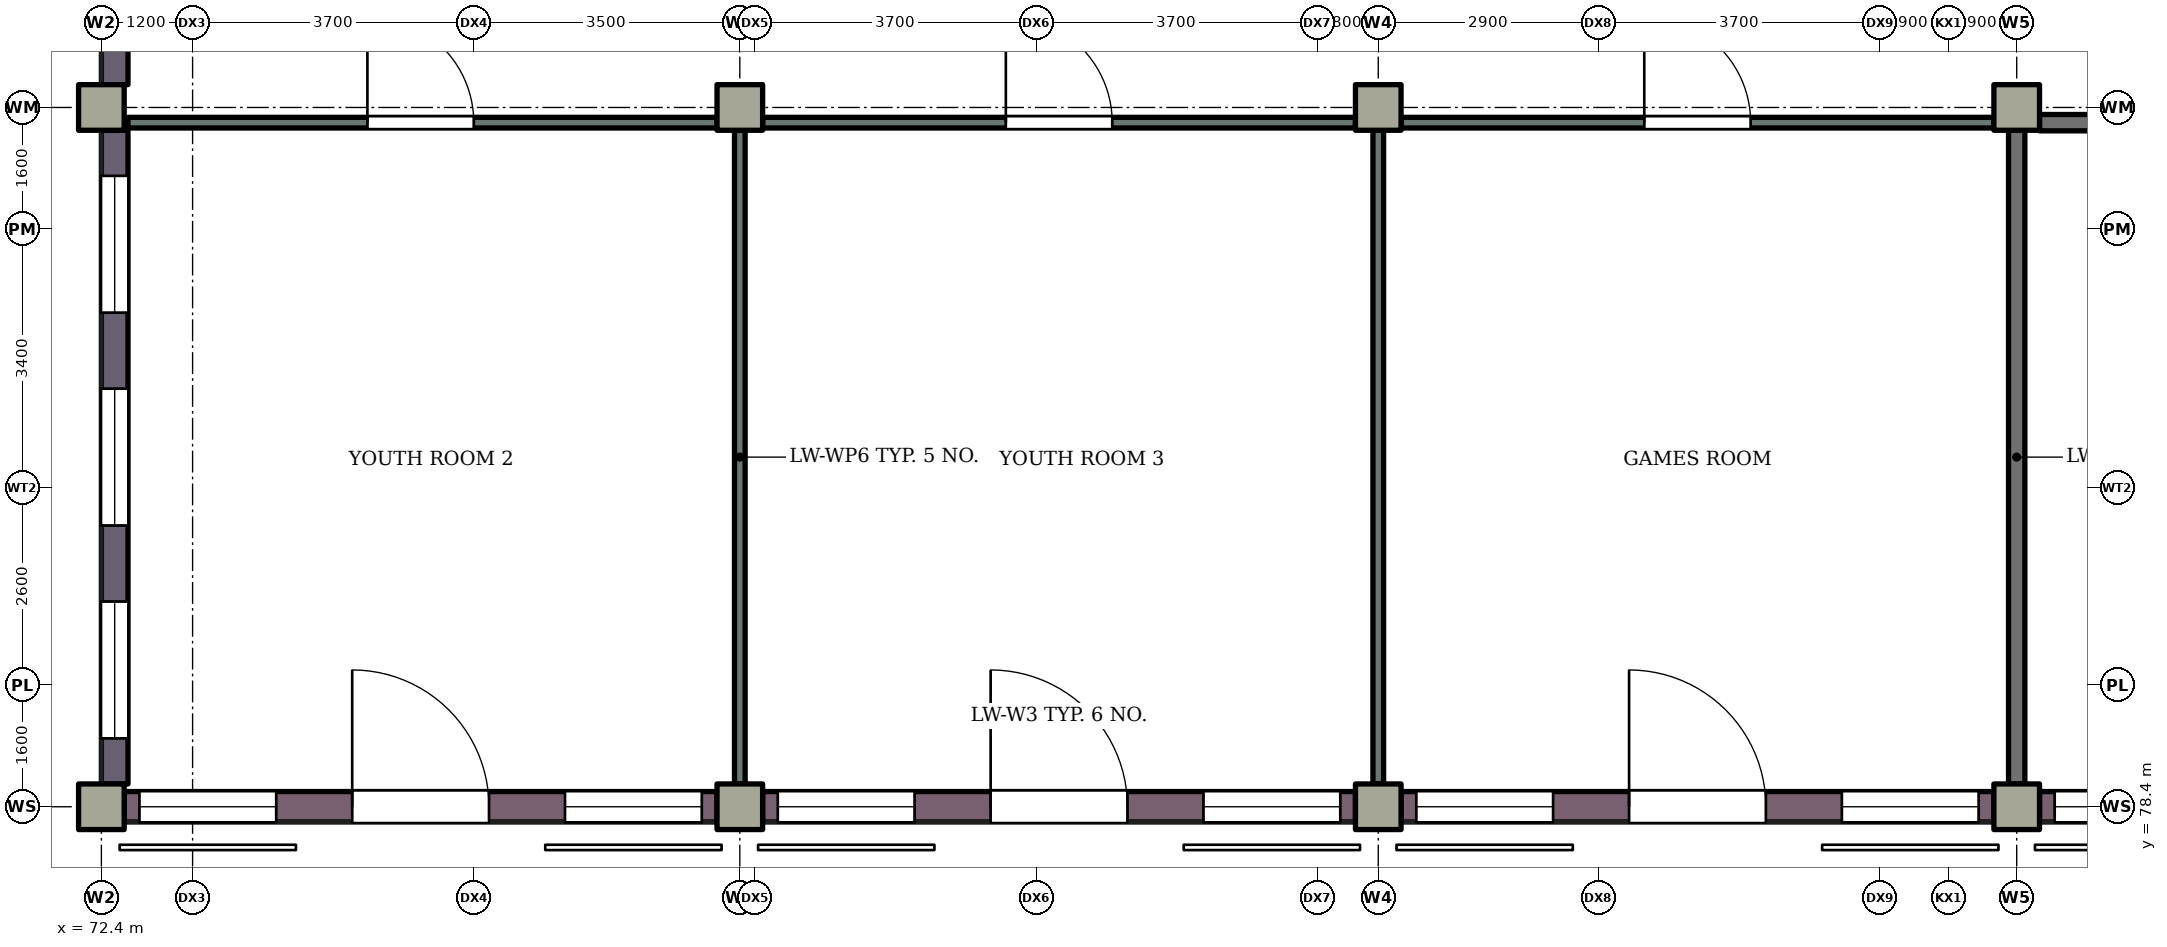
"""IFC4 building model, lengths in metres.
Left out: names, types, materials, properties, quantities, classifications, styles, units other than length and angle.
Written with IfcOpenShell. Run it as: python <this file> out.ifc"""

import sys

from ifc_helpers import new_model, si_unit, direction, frame, frame_2d, origin, origin_2d, place, context, subcontext, project, spatial, rectangle, extrude, element, fill, save


model = new_model("IFC4")
c1 = context("Model", 3, precision=1e-05, world=origin(), true_north=direction((0.0, 1.0)))
c2 = subcontext(c1, "Body", "Model", "MODEL_VIEW")
j1 = project(units=[si_unit("LENGTHUNIT", "METRE"), si_unit("PLANEANGLEUNIT", "RADIAN")], contexts=[c1])
p1 = place(None, origin())
s1 = spatial("IfcSite", under=j1, at=p1, CompositionType="ELEMENT")
p2 = place(p1, origin())
s2 = spatial("IfcBuilding", under=s1, at=p2, CompositionType="ELEMENT")
p3 = place(p2, frame((0.0, 0.0, 8.4)))
s3 = spatial("IfcBuildingStorey", under=s2, at=p3, CompositionType="ELEMENT", Elevation=8.4)
for number, where, z_axis, x_axis in (
    (1, (72.4, 87.6, 0.0), (0.0, 0.0, 1.0), (1.0, 0.0, 0.0)),
    (2, (80.8, 87.6, 0.0), (0.0, 0.0, 1.0), (1.0, 0.0, 0.0)),
    (3, (89.2, 87.6, 0.0), (0.0, 0.0, 1.0), (1.0, 0.0, 0.0)),
    (4, (97.6, 87.6, 0.0), (0.0, 0.0, 1.0), (1.0, 0.0, 0.0)),
    (5, (72.4, 78.4, 0.0), (0.0, 0.0, 1.0), (1.0, 0.0, 0.0)),
    (6, (80.8, 78.4, 0.0), (0.0, 0.0, 1.0), (1.0, 0.0, 0.0)),
    (7, (89.2, 78.4, 0.0), (0.0, 0.0, 1.0), (1.0, 0.0, 0.0)),
    (8, (97.6, 78.4, 0.0), (0.0, 0.0, 1.0), (1.0, 0.0, 0.0)),
):
    element("IfcColumn", number, at=place(p3, frame(where, z_axis=z_axis, x_axis=x_axis)), inside=s3, PredefinedType="COLUMN", context=c2, shape_type="SweptSolid", body=[
        extrude(rectangle(XDim=0.6, YDim=0.6, at=origin_2d()), origin(), (0.0, 0.0, 1.0), 4.2),
    ])
p4 = place(p3, frame((72.575, 78.7, 0.0), z_axis=(0.0, 0.0, 1.0), x_axis=(0.0, 1.0, 0.0)))
e9 = element("IfcWall", 9, at=p4, inside=s3, PredefinedType="SHEAR", context=c2, shape_type="SweptSolid", body=[
    extrude(rectangle(XDim=8.6, YDim=0.35, at=frame_2d((4.3, 0.0))), origin(), (0.0, 0.0, 1.0), 4.2),
])
p5 = place(p4, frame((0.6, 0.0, 0.9)))
e10 = element("IfcOpeningElement", 10, at=p5, cuts=e9, PredefinedType="OPENING", context=c2, shape_type="SweptSolid", body=[
    extrude(rectangle(XDim=1.8, YDim=2.1, at=frame_2d((0.9, 1.05))), frame((0.0, 0.185, 0.0), z_axis=(0.0, -1.0, 0.0), x_axis=(1.0, 0.0, 0.0)), (0.0, 0.0, 1.0), 0.37),
])
p6 = place(p4, frame((3.4, 0.0, 0.9)))
e11 = element("IfcOpeningElement", 11, at=p6, cuts=e9, PredefinedType="OPENING", context=c2, shape_type="SweptSolid", body=[
    extrude(rectangle(XDim=1.8, YDim=2.1, at=frame_2d((0.9, 1.05))), frame((0.0, 0.185, 0.0), z_axis=(0.0, -1.0, 0.0), x_axis=(1.0, 0.0, 0.0)), (0.0, 0.0, 1.0), 0.37),
])
p7 = place(p4, frame((6.2, 0.0, 0.9)))
e12 = element("IfcOpeningElement", 12, at=p7, cuts=e9, PredefinedType="OPENING", context=c2, shape_type="SweptSolid", body=[
    extrude(rectangle(XDim=1.8, YDim=2.1, at=frame_2d((0.9, 1.05))), frame((0.0, 0.185, 0.0), z_axis=(0.0, -1.0, 0.0), x_axis=(1.0, 0.0, 0.0)), (0.0, 0.0, 1.0), 0.37),
])
p8 = place(p3, frame((72.575, 87.9, 0.0), z_axis=(0.0, 0.0, 1.0), x_axis=(0.0, 1.0, 0.0)))
e13 = element("IfcWall", 13, at=p8, inside=s3, PredefinedType="SHEAR", context=c2, shape_type="SweptSolid", body=[
    extrude(rectangle(XDim=9.6, YDim=0.35, at=frame_2d((4.8, 0.0))), origin(), (0.0, 0.0, 1.0), 4.2),
])
p9 = place(p8, frame((5.3, 0.0, 0.9)))
e14 = element("IfcOpeningElement", 14, at=p9, cuts=e13, PredefinedType="OPENING", context=c2, shape_type="SweptSolid", body=[
    extrude(rectangle(XDim=1.8, YDim=2.1, at=frame_2d((0.9, 1.05))), frame((0.0, 0.185, 0.0), z_axis=(0.0, -1.0, 0.0), x_axis=(1.0, 0.0, 0.0)), (0.0, 0.0, 1.0), 0.37),
])
p10 = place(p3, frame((72.7, 78.4, 0.0), z_axis=(0.0, 0.0, 1.0), x_axis=(1.0, 0.0, 0.0)))
e15 = element("IfcWall", 15, at=p10, inside=s3, PredefinedType="SOLIDWALL", context=c2, shape_type="SweptSolid", body=[
    extrude(rectangle(XDim=7.8, YDim=0.4, at=frame_2d((3.9, 0.0))), origin(), (0.0, 0.0, 1.0), 3.32),
])
p11 = place(p10, frame((3.0, 0.0, 0.0)))
e16 = element("IfcOpeningElement", 16, at=p11, cuts=e15, PredefinedType="OPENING", context=c2, shape_type="SweptSolid", body=[
    extrude(rectangle(XDim=1.8, YDim=2.4, at=frame_2d((0.9, 1.2))), frame((0.0, 0.21, 0.0), z_axis=(0.0, -1.0, 0.0), x_axis=(1.0, 0.0, 0.0)), (0.0, 0.0, 1.0), 0.42),
])
p12 = place(p10, frame((0.2, 0.0, 0.9)))
e17 = element("IfcOpeningElement", 17, at=p12, cuts=e15, PredefinedType="OPENING", context=c2, shape_type="SweptSolid", body=[
    extrude(rectangle(XDim=1.8, YDim=1.9, at=frame_2d((0.9, 0.95))), frame((0.0, 0.21, 0.0), z_axis=(0.0, -1.0, 0.0), x_axis=(1.0, 0.0, 0.0)), (0.0, 0.0, 1.0), 0.42),
])
p13 = place(p10, frame((5.8, 0.0, 0.9)))
e18 = element("IfcOpeningElement", 18, at=p13, cuts=e15, PredefinedType="OPENING", context=c2, shape_type="SweptSolid", body=[
    extrude(rectangle(XDim=1.8, YDim=1.9, at=frame_2d((0.9, 0.95))), frame((0.0, 0.21, 0.0), z_axis=(0.0, -1.0, 0.0), x_axis=(1.0, 0.0, 0.0)), (0.0, 0.0, 1.0), 0.42),
])
p14 = place(p3, frame((81.1, 78.4, 0.0), z_axis=(0.0, 0.0, 1.0), x_axis=(1.0, 0.0, 0.0)))
e19 = element("IfcWall", 19, at=p14, inside=s3, PredefinedType="SOLIDWALL", context=c2, shape_type="SweptSolid", body=[
    extrude(rectangle(XDim=7.8, YDim=0.4, at=frame_2d((3.9, 0.0))), origin(), (0.0, 0.0, 1.0), 3.32),
])
p15 = place(p14, frame((3.0, 0.0, 0.0)))
e20 = element("IfcOpeningElement", 20, at=p15, cuts=e19, PredefinedType="OPENING", context=c2, shape_type="SweptSolid", body=[
    extrude(rectangle(XDim=1.8, YDim=2.4, at=frame_2d((0.9, 1.2))), frame((0.0, 0.21, 0.0), z_axis=(0.0, -1.0, 0.0), x_axis=(1.0, 0.0, 0.0)), (0.0, 0.0, 1.0), 0.42),
])
p16 = place(p14, frame((0.2, 0.0, 0.9)))
e21 = element("IfcOpeningElement", 21, at=p16, cuts=e19, PredefinedType="OPENING", context=c2, shape_type="SweptSolid", body=[
    extrude(rectangle(XDim=1.8, YDim=1.9, at=frame_2d((0.9, 0.95))), frame((0.0, 0.21, 0.0), z_axis=(0.0, -1.0, 0.0), x_axis=(1.0, 0.0, 0.0)), (0.0, 0.0, 1.0), 0.42),
])
p17 = place(p14, frame((5.8, 0.0, 0.9)))
e22 = element("IfcOpeningElement", 22, at=p17, cuts=e19, PredefinedType="OPENING", context=c2, shape_type="SweptSolid", body=[
    extrude(rectangle(XDim=1.8, YDim=1.9, at=frame_2d((0.9, 0.95))), frame((0.0, 0.21, 0.0), z_axis=(0.0, -1.0, 0.0), x_axis=(1.0, 0.0, 0.0)), (0.0, 0.0, 1.0), 0.42),
])
p18 = place(p3, frame((89.5, 78.4, 0.0), z_axis=(0.0, 0.0, 1.0), x_axis=(1.0, 0.0, 0.0)))
e23 = element("IfcWall", 23, at=p18, inside=s3, PredefinedType="SOLIDWALL", context=c2, shape_type="SweptSolid", body=[
    extrude(rectangle(XDim=7.8, YDim=0.4, at=frame_2d((3.9, 0.0))), origin(), (0.0, 0.0, 1.0), 3.32),
])
p19 = place(p18, frame((3.0, 0.0, 0.0)))
e24 = element("IfcOpeningElement", 24, at=p19, cuts=e23, PredefinedType="OPENING", context=c2, shape_type="SweptSolid", body=[
    extrude(rectangle(XDim=1.8, YDim=2.4, at=frame_2d((0.9, 1.2))), frame((0.0, 0.21, 0.0), z_axis=(0.0, -1.0, 0.0), x_axis=(1.0, 0.0, 0.0)), (0.0, 0.0, 1.0), 0.42),
])
p20 = place(p18, frame((0.2, 0.0, 0.9)))
e25 = element("IfcOpeningElement", 25, at=p20, cuts=e23, PredefinedType="OPENING", context=c2, shape_type="SweptSolid", body=[
    extrude(rectangle(XDim=1.8, YDim=1.9, at=frame_2d((0.9, 0.95))), frame((0.0, 0.21, 0.0), z_axis=(0.0, -1.0, 0.0), x_axis=(1.0, 0.0, 0.0)), (0.0, 0.0, 1.0), 0.42),
])
p21 = place(p18, frame((5.8, 0.0, 0.9)))
e26 = element("IfcOpeningElement", 26, at=p21, cuts=e23, PredefinedType="OPENING", context=c2, shape_type="SweptSolid", body=[
    extrude(rectangle(XDim=1.8, YDim=1.9, at=frame_2d((0.9, 0.95))), frame((0.0, 0.21, 0.0), z_axis=(0.0, -1.0, 0.0), x_axis=(1.0, 0.0, 0.0)), (0.0, 0.0, 1.0), 0.42),
])
p22 = place(p3, frame((97.9, 78.4, 0.0), z_axis=(0.0, 0.0, 1.0), x_axis=(1.0, 0.0, 0.0)))
e27 = element("IfcWall", 27, at=p22, inside=s3, PredefinedType="SOLIDWALL", context=c2, shape_type="SweptSolid", body=[
    extrude(rectangle(XDim=7.8, YDim=0.4, at=frame_2d((3.9, 0.0))), origin(), (0.0, 0.0, 1.0), 3.32),
])
p23 = place(p22, frame((3.0, 0.0, 0.0)))
e28 = element("IfcOpeningElement", 28, at=p23, cuts=e27, PredefinedType="OPENING", context=c2, shape_type="SweptSolid", body=[
    extrude(rectangle(XDim=1.8, YDim=2.4, at=frame_2d((0.9, 1.2))), frame((0.0, 0.21, 0.0), z_axis=(0.0, -1.0, 0.0), x_axis=(1.0, 0.0, 0.0)), (0.0, 0.0, 1.0), 0.42),
])
p24 = place(p22, frame((0.2, 0.0, 0.9)))
e29 = element("IfcOpeningElement", 29, at=p24, cuts=e27, PredefinedType="OPENING", context=c2, shape_type="SweptSolid", body=[
    extrude(rectangle(XDim=1.8, YDim=1.9, at=frame_2d((0.9, 0.95))), frame((0.0, 0.21, 0.0), z_axis=(0.0, -1.0, 0.0), x_axis=(1.0, 0.0, 0.0)), (0.0, 0.0, 1.0), 0.42),
])
p25 = place(p22, frame((5.8, 0.0, 0.9)))
e30 = element("IfcOpeningElement", 30, at=p25, cuts=e27, PredefinedType="OPENING", context=c2, shape_type="SweptSolid", body=[
    extrude(rectangle(XDim=1.8, YDim=1.9, at=frame_2d((0.9, 0.95))), frame((0.0, 0.21, 0.0), z_axis=(0.0, -1.0, 0.0), x_axis=(1.0, 0.0, 0.0)), (0.0, 0.0, 1.0), 0.42),
])
p26 = place(p3, frame((97.9, 87.4, 0.0), z_axis=(0.0, 0.0, 1.0), x_axis=(1.0, 0.0, 0.0)))
e31 = element("IfcWall", 31, at=p26, inside=s3, PredefinedType="PARTITIONING", context=c2, shape_type="SweptSolid", body=[
    extrude(rectangle(XDim=7.8, YDim=0.215, at=frame_2d((3.9, 0.0))), origin(), (0.0, 0.0, 1.0), 3.12),
])
p27 = place(p26, frame((3.375, 0.0, 0.0)))
e32 = element("IfcOpeningElement", 32, at=p27, cuts=e31, PredefinedType="OPENING", context=c2, shape_type="SweptSolid", body=[
    extrude(rectangle(XDim=1.05, YDim=2.1, at=frame_2d((0.525, 1.05))), frame((0.0, 0.117, 0.0), z_axis=(0.0, -1.0, 0.0), x_axis=(1.0, 0.0, 0.0)), (0.0, 0.0, 1.0), 0.235),
])
p28 = place(p3, frame((72.75, 87.4, 0.0), z_axis=(0.0, 0.0, 1.0), x_axis=(1.0, 0.0, 0.0)))
e33 = element("IfcWall", 33, at=p28, inside=s3, PredefinedType="PARTITIONING", context=c2, shape_type="SweptSolid", body=[
    extrude(rectangle(XDim=7.75, YDim=0.14, at=frame_2d((3.875, 0.0))), origin(), (0.0, 0.0, 1.0), 3.12),
])
p29 = place(p28, frame((3.15, 0.0, 0.0)))
e34 = element("IfcOpeningElement", 34, at=p29, cuts=e33, PredefinedType="OPENING", context=c2, shape_type="SweptSolid", body=[
    extrude(rectangle(XDim=1.4, YDim=2.1, at=frame_2d((0.7, 1.05))), frame((0.0, 0.08, 0.0), z_axis=(0.0, -1.0, 0.0), x_axis=(1.0, 0.0, 0.0)), (0.0, 0.0, 1.0), 0.16),
])
p30 = place(p3, frame((81.1, 87.4, 0.0), z_axis=(0.0, 0.0, 1.0), x_axis=(1.0, 0.0, 0.0)))
e35 = element("IfcWall", 35, at=p30, inside=s3, PredefinedType="PARTITIONING", context=c2, shape_type="SweptSolid", body=[
    extrude(rectangle(XDim=7.8, YDim=0.14, at=frame_2d((3.9, 0.0))), origin(), (0.0, 0.0, 1.0), 3.12),
])
p31 = place(p30, frame((3.2, 0.0, 0.0)))
e36 = element("IfcOpeningElement", 36, at=p31, cuts=e35, PredefinedType="OPENING", context=c2, shape_type="SweptSolid", body=[
    extrude(rectangle(XDim=1.4, YDim=2.1, at=frame_2d((0.7, 1.05))), frame((0.0, 0.08, 0.0), z_axis=(0.0, -1.0, 0.0), x_axis=(1.0, 0.0, 0.0)), (0.0, 0.0, 1.0), 0.16),
])
p32 = place(p3, frame((89.5, 87.4, 0.0), z_axis=(0.0, 0.0, 1.0), x_axis=(1.0, 0.0, 0.0)))
e37 = element("IfcWall", 37, at=p32, inside=s3, PredefinedType="PARTITIONING", context=c2, shape_type="SweptSolid", body=[
    extrude(rectangle(XDim=7.8, YDim=0.14, at=frame_2d((3.9, 0.0))), origin(), (0.0, 0.0, 1.0), 3.12),
])
p33 = place(p32, frame((3.2, 0.0, 0.0)))
e38 = element("IfcOpeningElement", 38, at=p33, cuts=e37, PredefinedType="OPENING", context=c2, shape_type="SweptSolid", body=[
    extrude(rectangle(XDim=1.4, YDim=2.1, at=frame_2d((0.7, 1.05))), frame((0.0, 0.08, 0.0), z_axis=(0.0, -1.0, 0.0), x_axis=(1.0, 0.0, 0.0)), (0.0, 0.0, 1.0), 0.16),
])
for number, where, z_axis, x_axis in (
    (39, (80.8, 78.7, 0.0), (0.0, 0.0, 1.0), (0.0, 1.0, 0.0)),
    (40, (89.2, 78.7, 0.0), (0.0, 0.0, 1.0), (0.0, 1.0, 0.0)),
):
    element("IfcWall", number, at=place(p3, frame(where, z_axis=z_axis, x_axis=x_axis)), inside=s3, PredefinedType="PARTITIONING", context=c2, shape_type="SweptSolid", body=[
        extrude(rectangle(XDim=8.6, YDim=0.14, at=frame_2d((4.3, 0.0))), origin(), (0.0, 0.0, 1.0), 3.02),
    ])
p34 = place(p3, frame((97.6, 78.7, 0.0), z_axis=(0.0, 0.0, 1.0), x_axis=(0.0, 1.0, 0.0)))
e41 = element("IfcWall", 41, at=p34, inside=s3, PredefinedType="PARTITIONING", context=c2, shape_type="SweptSolid", body=[
    extrude(rectangle(XDim=8.6, YDim=0.215, at=frame_2d((4.3, 0.0))), origin(), (0.0, 0.0, 1.0), 3.02),
])
p35 = place(p11, origin())
e42 = element("IfcDoor", 42, at=p35, inside=s3, OperationType="DOUBLE_DOOR_SINGLE_SWING", PredefinedType="DOOR", context=c2, shape_type="SweptSolid", body=[
    extrude(rectangle(XDim=1.8, YDim=2.4, at=frame_2d((0.9, 1.2))), frame((0.0, 0.025, 0.0), z_axis=(0.0, -1.0, 0.0), x_axis=(1.0, 0.0, 0.0)), (0.0, 0.0, 1.0), 0.05),
])
fill(e16, e42)
p36 = place(p12, origin())
e43 = element("IfcWindow", 43, at=p36, inside=s3, PartitioningType="SINGLE_PANEL", PredefinedType="WINDOW", context=c2, shape_type="SweptSolid", body=[
    extrude(rectangle(XDim=1.8, YDim=1.9, at=frame_2d((0.9, 0.95))), frame((0.0, 0.03, 0.0), z_axis=(0.0, -1.0, 0.0), x_axis=(1.0, 0.0, 0.0)), (0.0, 0.0, 1.0), 0.06),
])
fill(e17, e43)
p37 = place(p13, origin())
e44 = element("IfcWindow", 44, at=p37, inside=s3, PartitioningType="SINGLE_PANEL", PredefinedType="WINDOW", context=c2, shape_type="SweptSolid", body=[
    extrude(rectangle(XDim=1.8, YDim=1.9, at=frame_2d((0.9, 0.95))), frame((0.0, 0.03, 0.0), z_axis=(0.0, -1.0, 0.0), x_axis=(1.0, 0.0, 0.0)), (0.0, 0.0, 1.0), 0.06),
])
fill(e18, e44)
p38 = place(p15, origin())
e45 = element("IfcDoor", 45, at=p38, inside=s3, OperationType="DOUBLE_DOOR_SINGLE_SWING", PredefinedType="DOOR", context=c2, shape_type="SweptSolid", body=[
    extrude(rectangle(XDim=1.8, YDim=2.4, at=frame_2d((0.9, 1.2))), frame((0.0, 0.025, 0.0), z_axis=(0.0, -1.0, 0.0), x_axis=(1.0, 0.0, 0.0)), (0.0, 0.0, 1.0), 0.05),
])
fill(e20, e45)
p39 = place(p16, origin())
e46 = element("IfcWindow", 46, at=p39, inside=s3, PartitioningType="SINGLE_PANEL", PredefinedType="WINDOW", context=c2, shape_type="SweptSolid", body=[
    extrude(rectangle(XDim=1.8, YDim=1.9, at=frame_2d((0.9, 0.95))), frame((0.0, 0.03, 0.0), z_axis=(0.0, -1.0, 0.0), x_axis=(1.0, 0.0, 0.0)), (0.0, 0.0, 1.0), 0.06),
])
fill(e21, e46)
p40 = place(p17, origin())
e47 = element("IfcWindow", 47, at=p40, inside=s3, PartitioningType="SINGLE_PANEL", PredefinedType="WINDOW", context=c2, shape_type="SweptSolid", body=[
    extrude(rectangle(XDim=1.8, YDim=1.9, at=frame_2d((0.9, 0.95))), frame((0.0, 0.03, 0.0), z_axis=(0.0, -1.0, 0.0), x_axis=(1.0, 0.0, 0.0)), (0.0, 0.0, 1.0), 0.06),
])
fill(e22, e47)
p41 = place(p19, origin())
e48 = element("IfcDoor", 48, at=p41, inside=s3, OperationType="DOUBLE_DOOR_SINGLE_SWING", PredefinedType="DOOR", context=c2, shape_type="SweptSolid", body=[
    extrude(rectangle(XDim=1.8, YDim=2.4, at=frame_2d((0.9, 1.2))), frame((0.0, 0.025, 0.0), z_axis=(0.0, -1.0, 0.0), x_axis=(1.0, 0.0, 0.0)), (0.0, 0.0, 1.0), 0.05),
])
fill(e24, e48)
p42 = place(p20, origin())
e49 = element("IfcWindow", 49, at=p42, inside=s3, PartitioningType="SINGLE_PANEL", PredefinedType="WINDOW", context=c2, shape_type="SweptSolid", body=[
    extrude(rectangle(XDim=1.8, YDim=1.9, at=frame_2d((0.9, 0.95))), frame((0.0, 0.03, 0.0), z_axis=(0.0, -1.0, 0.0), x_axis=(1.0, 0.0, 0.0)), (0.0, 0.0, 1.0), 0.06),
])
fill(e25, e49)
p43 = place(p21, origin())
e50 = element("IfcWindow", 50, at=p43, inside=s3, PartitioningType="SINGLE_PANEL", PredefinedType="WINDOW", context=c2, shape_type="SweptSolid", body=[
    extrude(rectangle(XDim=1.8, YDim=1.9, at=frame_2d((0.9, 0.95))), frame((0.0, 0.03, 0.0), z_axis=(0.0, -1.0, 0.0), x_axis=(1.0, 0.0, 0.0)), (0.0, 0.0, 1.0), 0.06),
])
fill(e26, e50)
p44 = place(p24, origin())
e51 = element("IfcWindow", 51, at=p44, inside=s3, PartitioningType="SINGLE_PANEL", PredefinedType="WINDOW", context=c2, shape_type="SweptSolid", body=[
    extrude(rectangle(XDim=1.8, YDim=1.9, at=frame_2d((0.9, 0.95))), frame((0.0, 0.03, 0.0), z_axis=(0.0, -1.0, 0.0), x_axis=(1.0, 0.0, 0.0)), (0.0, 0.0, 1.0), 0.06),
])
fill(e29, e51)
p45 = place(p5, origin())
e52 = element("IfcWindow", 52, at=p45, inside=s3, PartitioningType="SINGLE_PANEL", PredefinedType="WINDOW", context=c2, shape_type="SweptSolid", body=[
    extrude(rectangle(XDim=1.8, YDim=2.1, at=frame_2d((0.9, 1.05))), frame((0.0, 0.03, 0.0), z_axis=(0.0, -1.0, 0.0), x_axis=(1.0, 0.0, 0.0)), (0.0, 0.0, 1.0), 0.06),
])
fill(e10, e52)
p46 = place(p6, origin())
e53 = element("IfcWindow", 53, at=p46, inside=s3, PartitioningType="SINGLE_PANEL", PredefinedType="WINDOW", context=c2, shape_type="SweptSolid", body=[
    extrude(rectangle(XDim=1.8, YDim=2.1, at=frame_2d((0.9, 1.05))), frame((0.0, 0.03, 0.0), z_axis=(0.0, -1.0, 0.0), x_axis=(1.0, 0.0, 0.0)), (0.0, 0.0, 1.0), 0.06),
])
fill(e11, e53)
p47 = place(p7, origin())
e54 = element("IfcWindow", 54, at=p47, inside=s3, PartitioningType="SINGLE_PANEL", PredefinedType="WINDOW", context=c2, shape_type="SweptSolid", body=[
    extrude(rectangle(XDim=1.8, YDim=2.1, at=frame_2d((0.9, 1.05))), frame((0.0, 0.03, 0.0), z_axis=(0.0, -1.0, 0.0), x_axis=(1.0, 0.0, 0.0)), (0.0, 0.0, 1.0), 0.06),
])
fill(e12, e54)
p48 = place(p29, origin())
e55 = element("IfcDoor", 55, at=p48, inside=s3, OperationType="DOUBLE_DOOR_SINGLE_SWING", PredefinedType="DOOR", context=c2, shape_type="SweptSolid", body=[
    extrude(rectangle(XDim=1.4, YDim=2.1, at=frame_2d((0.7, 1.05))), frame((0.0, 0.025, 0.0), z_axis=(0.0, -1.0, 0.0), x_axis=(1.0, 0.0, 0.0)), (0.0, 0.0, 1.0), 0.05),
])
fill(e34, e55)
p49 = place(p31, origin())
e56 = element("IfcDoor", 56, at=p49, inside=s3, OperationType="DOUBLE_DOOR_SINGLE_SWING", PredefinedType="DOOR", context=c2, shape_type="SweptSolid", body=[
    extrude(rectangle(XDim=1.4, YDim=2.1, at=frame_2d((0.7, 1.05))), frame((0.0, 0.025, 0.0), z_axis=(0.0, -1.0, 0.0), x_axis=(1.0, 0.0, 0.0)), (0.0, 0.0, 1.0), 0.05),
])
fill(e36, e56)
p50 = place(p33, origin())
e57 = element("IfcDoor", 57, at=p50, inside=s3, OperationType="DOUBLE_DOOR_SINGLE_SWING", PredefinedType="DOOR", context=c2, shape_type="SweptSolid", body=[
    extrude(rectangle(XDim=1.4, YDim=2.1, at=frame_2d((0.7, 1.05))), frame((0.0, 0.025, 0.0), z_axis=(0.0, -1.0, 0.0), x_axis=(1.0, 0.0, 0.0)), (0.0, 0.0, 1.0), 0.05),
])
fill(e38, e57)
save(model, sys.argv[1])
